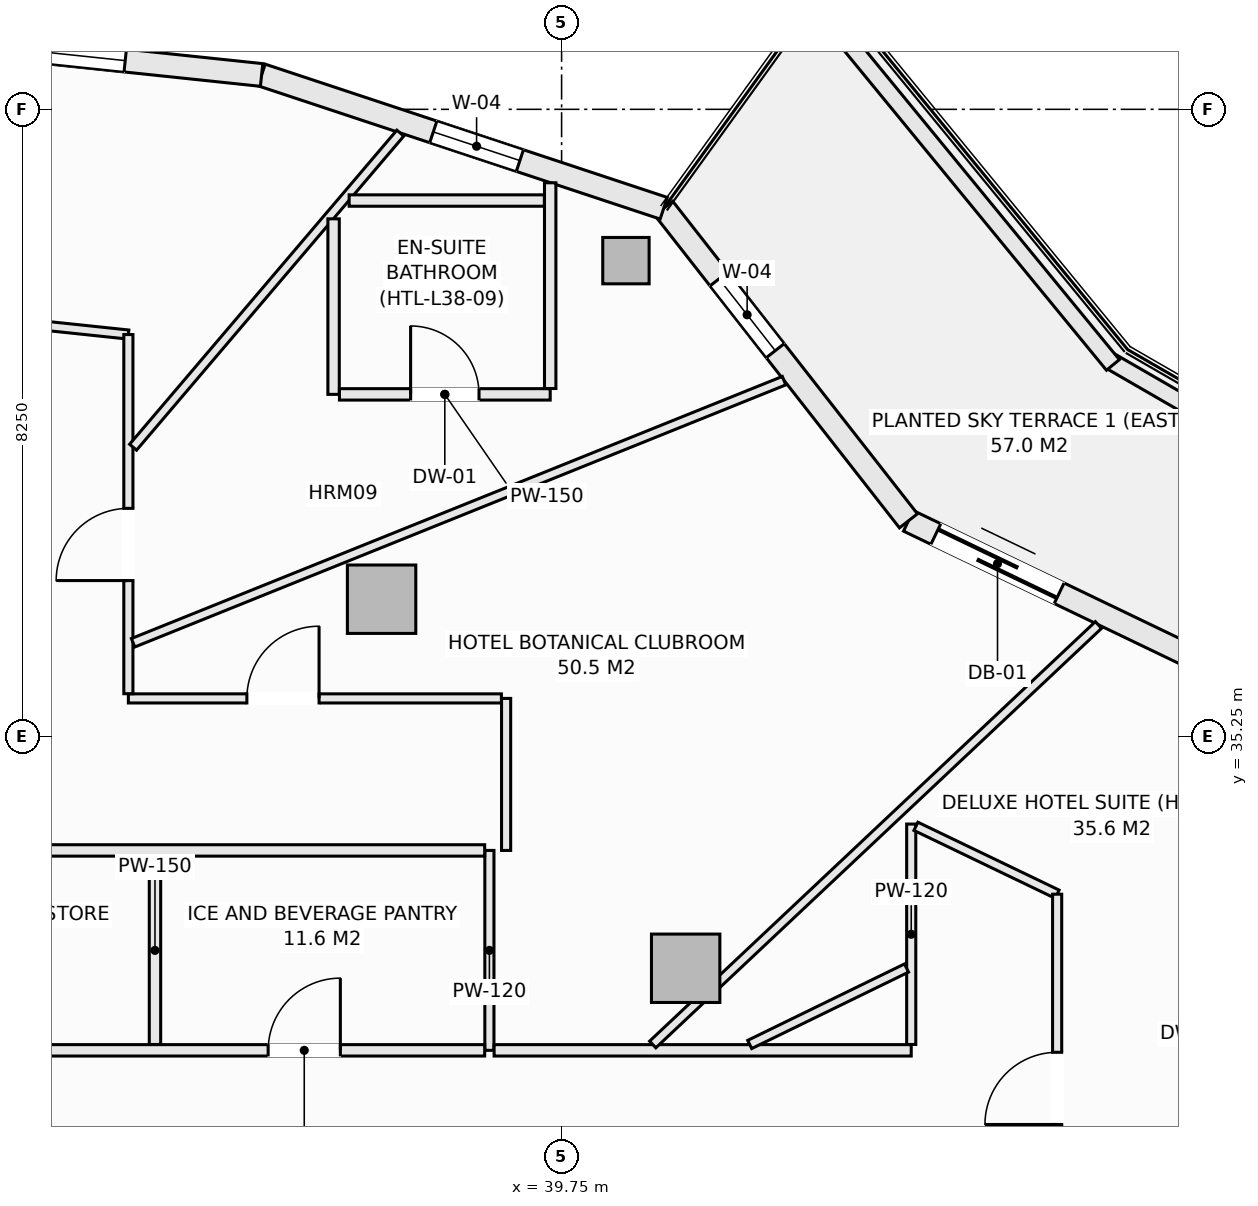
"""IFC4 building model, lengths in metres.
Left out: names, types, materials, properties, quantities, classifications, styles, units other than length and angle.
Written with IfcOpenShell. Run it as: python <this file> out.ifc"""

import sys

from ifc_helpers import new_model, si_unit, direction, frame, frame_2d, origin, origin_2d, place, context, subcontext, project, spatial, rectangle, hollow_rectangle, extrude, element, fill, save


model = new_model("IFC4")
c1 = context("Model", 3, precision=1e-05, world=origin(), true_north=direction((0.0, 1.0)))
c2 = subcontext(c1, "Body", "Model", "MODEL_VIEW")
j1 = project(units=[si_unit("LENGTHUNIT", "METRE"), si_unit("PLANEANGLEUNIT", "RADIAN")], contexts=[c1])
p1 = place(None, origin())
s1 = spatial("IfcSite", under=j1, at=p1, CompositionType="ELEMENT")
p2 = place(p1, origin())
s2 = spatial("IfcBuilding", under=s1, at=p2, CompositionType="ELEMENT")
p3 = place(p2, frame((0.0, 0.0, 149.5)))
s3 = spatial("IfcBuildingStorey", under=s2, at=p3, CompositionType="ELEMENT", Elevation=149.5)
p4 = place(p3, frame((40.596, 41.51, -0.27), z_axis=(0.0, 0.0, 1.0), x_axis=(1.0, 0.0, 0.0)))
e1 = element("IfcColumn", 1, at=p4, inside=s3, PredefinedType="COLUMN", context=c2, shape_type="SweptSolid", body=[
    extrude(hollow_rectangle(XDim=0.61, YDim=0.61, WallThickness=0.025, at=origin_2d()), origin(), (0.0, 0.0, 1.0), 3.4),
])
for number, where, z_axis, x_axis in (
    (2, (41.382, 32.199, -0.27), (0.0, 0.0, 1.0), (1.0, 0.0, 0.0)),
    (3, (37.382, 37.055, -0.27), (0.0, 0.0, 1.0), (1.0, 0.0, 0.0)),
):
    element("IfcColumn", number, at=place(p3, frame(where, z_axis=z_axis, x_axis=x_axis)), inside=s3, PredefinedType="COLUMN", context=c2, shape_type="SweptSolid", body=[
        extrude(rectangle(XDim=0.9, YDim=0.9, at=origin_2d()), origin(), (0.0, 0.0, 1.0), 3.4),
    ])
p5 = place(p3, frame((44.313, 38.086, 0.0), z_axis=(0.0, 0.0, 1.0), x_axis=(0.901353070301, -0.433085029363, 0.0)))
e4 = element("IfcWall", 4, at=p5, inside=s3, PredefinedType="SOLIDWALL", context=c2, shape_type="SweptSolid", body=[
    extrude(rectangle(XDim=5.336, YDim=0.3, at=frame_2d((2.668, 0.0))), origin(), (0.0, 0.0, 1.0), 2.653),
])
p6 = place(p5, frame((0.4, 0.0, 0.0)))
e5 = element("IfcOpeningElement", 5, at=p6, cuts=e4, PredefinedType="OPENING", context=c2, shape_type="SweptSolid", body=[
    extrude(rectangle(XDim=1.8, YDim=2.25, at=frame_2d((0.9, 1.125))), frame((0.0, 0.16, 0.0), z_axis=(0.0, -1.0, 0.0), x_axis=(1.0, 0.0, 0.0)), (0.0, 0.0, 1.0), 0.32),
])
p7 = place(p3, frame((41.094, 42.199, 0.0), z_axis=(0.0, 0.0, 1.0), x_axis=(0.616429245738, -0.787410302828, 0.0)))
e6 = element("IfcWall", 6, at=p7, inside=s3, PredefinedType="SOLIDWALL", context=c2, shape_type="SweptSolid", body=[
    extrude(rectangle(XDim=5.223, YDim=0.3, at=frame_2d((2.612, 0.0))), origin(), (0.0, 0.0, 1.0), 2.653),
])
p8 = place(p7, frame((1.18, 0.0, 0.72)))
e7 = element("IfcOpeningElement", 7, at=p8, cuts=e6, PredefinedType="OPENING", context=c2, shape_type="SweptSolid", body=[
    extrude(rectangle(XDim=1.2, YDim=1.65, at=frame_2d((0.6, 0.825))), frame((0.0, 0.16, 0.0), z_axis=(0.0, -1.0, 0.0), x_axis=(1.0, 0.0, 0.0)), (0.0, 0.0, 1.0), 0.32),
])
p9 = place(p3, frame((35.803, 43.952, 0.0), z_axis=(0.0, 0.0, 1.0), x_axis=(0.949246811547, -0.314532177636, 0.0)))
e8 = element("IfcWall", 8, at=p9, inside=s3, PredefinedType="SOLIDWALL", context=c2, shape_type="SweptSolid", body=[
    extrude(rectangle(XDim=5.574, YDim=0.3, at=frame_2d((2.787, 0.0))), origin(), (0.0, 0.0, 1.0), 2.653),
])
p10 = place(p9, frame((2.38, 0.0, 0.72)))
e9 = element("IfcOpeningElement", 9, at=p10, cuts=e8, PredefinedType="OPENING", context=c2, shape_type="SweptSolid", body=[
    extrude(rectangle(XDim=1.2, YDim=1.65, at=frame_2d((0.6, 0.825))), frame((0.0, 0.16, 0.0), z_axis=(0.0, -1.0, 0.0), x_axis=(1.0, 0.0, 0.0)), (0.0, 0.0, 1.0), 0.32),
])
p11 = place(p3, frame((30.125, 44.55, 0.0), z_axis=(0.0, 0.0, 1.0), x_axis=(0.994496545245, -0.104769372887, 0.0)))
e10 = element("IfcWall", 10, at=p11, inside=s3, PredefinedType="SOLIDWALL", context=c2, shape_type="SweptSolid", body=[
    extrude(rectangle(XDim=5.709, YDim=0.3, at=frame_2d((2.854, 0.0))), origin(), (0.0, 0.0, 1.0), 2.653),
])
p12 = place(p11, frame((1.805, 0.0, 0.74)))
e11 = element("IfcOpeningElement", 11, at=p12, cuts=e10, PredefinedType="OPENING", context=c2, shape_type="SweptSolid", body=[
    extrude(rectangle(XDim=2.1, YDim=1.7, at=frame_2d((1.05, 0.85))), frame((0.0, 0.16, 0.0), z_axis=(0.0, -1.0, 0.0), x_axis=(1.0, 0.0, 0.0)), (0.0, 0.0, 1.0), 0.32),
])
p13 = place(p3, frame((46.958, 40.195, 0.0), z_axis=(0.0, 0.0, 1.0), x_axis=(0.866058128659, -0.499943314571, 0.0)))
e12 = element("IfcWall", 12, at=p13, inside=s3, PredefinedType="PARAPET", context=c2, shape_type="SweptSolid", body=[
    extrude(rectangle(XDim=6.06, YDim=0.22, at=frame_2d((3.03, 0.0))), origin(), (0.0, 0.0, 1.0), 0.52),
])
p14 = place(p3, frame((43.042, 44.964, 0.0), z_axis=(0.0, 0.0, 1.0), x_axis=(0.634429234628, -0.77298094818, 0.0)))
e13 = element("IfcWall", 13, at=p14, inside=s3, PredefinedType="PARAPET", context=c2, shape_type="SweptSolid", body=[
    extrude(rectangle(XDim=6.245, YDim=0.22, at=frame_2d((3.123, 0.0))), origin(), (0.0, 0.0, 1.0), 0.52),
])
p15 = place(p3, frame((38.8, 31.12, 0.0), z_axis=(0.0, 0.0, 1.0), x_axis=(0.0, 1.0, 0.0)))
e14 = element("IfcWall", 14, at=p15, inside=s3, PredefinedType="PARTITIONING", context=c2, shape_type="SweptSolid", body=[
    extrude(rectangle(XDim=2.63, YDim=0.12, at=frame_2d((1.315, 0.0))), origin(), (0.0, 0.0, 1.0), 3.13),
])
p16 = place(p3, frame((30.077, 31.12, 0.0), z_axis=(0.0, 0.0, 1.0), x_axis=(1.0, 0.0, 0.0)))
e15 = element("IfcWall", 15, at=p16, inside=s3, PredefinedType="PARTITIONING", context=c2, shape_type="SweptSolid", body=[
    extrude(rectangle(XDim=8.661, YDim=0.15, at=frame_2d((4.331, 0.0))), origin(), (0.0, 0.0, 1.0), 3.13),
])
p17 = place(p16, frame((1.892, 0.0, 0.0)))
e16 = element("IfcOpeningElement", 16, at=p17, cuts=e15, PredefinedType="OPENING", context=c2, shape_type="SweptSolid", body=[
    extrude(rectangle(XDim=0.95, YDim=2.1, at=frame_2d((0.475, 1.05))), frame((0.0, 0.085, 0.0), z_axis=(0.0, -1.0, 0.0), x_axis=(1.0, 0.0, 0.0)), (0.0, 0.0, 1.0), 0.17),
])
p18 = place(p16, frame((5.812, 0.0, 0.0)))
e17 = element("IfcOpeningElement", 17, at=p18, cuts=e15, PredefinedType="OPENING", context=c2, shape_type="SweptSolid", body=[
    extrude(rectangle(XDim=0.95, YDim=2.1, at=frame_2d((0.475, 1.05))), frame((0.0, 0.085, 0.0), z_axis=(0.0, -1.0, 0.0), x_axis=(1.0, 0.0, 0.0)), (0.0, 0.0, 1.0), 0.17),
])
p19 = place(p3, frame((38.862, 31.12, 0.0), z_axis=(0.0, 0.0, 1.0), x_axis=(1.0, 0.0, 0.0)))
e18 = element("IfcWall", 18, at=p19, inside=s3, PredefinedType="PARTITIONING", context=c2, shape_type="SweptSolid", body=[
    extrude(rectangle(XDim=5.488, YDim=0.15, at=frame_2d((2.744, 0.0))), origin(), (0.0, 0.0, 1.0), 3.13),
])
p20 = place(p3, frame((30.077, 33.75, 0.0), z_axis=(0.0, 0.0, 1.0), x_axis=(1.0, 0.0, 0.0)))
e19 = element("IfcWall", 19, at=p20, inside=s3, PredefinedType="PARTITIONING", context=c2, shape_type="SweptSolid", body=[
    extrude(rectangle(XDim=8.661, YDim=0.15, at=frame_2d((4.331, 0.0))), origin(), (0.0, 0.0, 1.0), 3.13),
])
p21 = place(p3, frame((34.4, 31.197, 0.0), z_axis=(0.0, 0.0, 1.0), x_axis=(0.0, 1.0, 0.0)))
e20 = element("IfcWall", 20, at=p21, inside=s3, PredefinedType="PARTITIONING", context=c2, shape_type="SweptSolid", body=[
    extrude(rectangle(XDim=2.476, YDim=0.15, at=frame_2d((1.238, 0.0))), origin(), (0.0, 0.0, 1.0), 3.13),
])
p22 = place(p3, frame((39.02, 33.75, 0.0), z_axis=(0.0, 0.0, 1.0), x_axis=(0.0, 1.0, 0.0)))
e21 = element("IfcWall", 21, at=p22, inside=s3, PredefinedType="PARTITIONING", context=c2, shape_type="SweptSolid", body=[
    extrude(rectangle(XDim=2.0, YDim=0.12, at=frame_2d((1.0, 0.0))), origin(), (0.0, 0.0, 1.0), 3.13),
])
p23 = place(p3, frame((34.05, 35.75, 0.0), z_axis=(0.0, 0.0, 1.0), x_axis=(1.0, 0.0, 0.0)))
e22 = element("IfcWall", 22, at=p23, inside=s3, PredefinedType="PARTITIONING", context=c2, shape_type="SweptSolid", body=[
    extrude(rectangle(XDim=4.908, YDim=0.12, at=frame_2d((2.454, 0.0))), origin(), (0.0, 0.0, 1.0), 2.505),
])
p24 = place(p23, frame((1.559, 0.0, 0.0)))
e23 = element("IfcOpeningElement", 23, at=p24, cuts=e22, PredefinedType="OPENING", context=c2, shape_type="SweptSolid", body=[
    extrude(rectangle(XDim=0.95, YDim=2.1, at=frame_2d((0.475, 1.05))), frame((0.0, 0.07, 0.0), z_axis=(0.0, -1.0, 0.0), x_axis=(1.0, 0.0, 0.0)), (0.0, 0.0, 1.0), 0.14),
])
p25 = place(p3, frame((32.212, 40.73, 0.0), z_axis=(0.0, 0.0, 1.0), x_axis=(0.994512688404, -0.1046160246, 0.0)))
e24 = element("IfcWall", 24, at=p25, inside=s3, PredefinedType="PARTITIONING", context=c2, shape_type="SweptSolid", body=[
    extrude(rectangle(XDim=1.848, YDim=0.12, at=frame_2d((0.924, 0.0))), origin(), (0.0, 0.0, 1.0), 3.13),
])
p26 = place(p3, frame((34.05, 35.812, 0.0), z_axis=(0.0, 0.0, 1.0), x_axis=(0.0, 1.0, 0.0)))
e25 = element("IfcWall", 25, at=p26, inside=s3, PredefinedType="PARTITIONING", context=c2, shape_type="SweptSolid", body=[
    extrude(rectangle(XDim=4.725, YDim=0.12, at=frame_2d((2.363, 0.0))), origin(), (0.0, 0.0, 1.0), 2.812),
])
p27 = place(p26, frame((1.488, 0.0, 0.0)))
e26 = element("IfcOpeningElement", 26, at=p27, cuts=e25, PredefinedType="OPENING", context=c2, shape_type="SweptSolid", body=[
    extrude(rectangle(XDim=0.95, YDim=2.1, at=frame_2d((0.475, 1.05))), frame((0.0, 0.07, 0.0), z_axis=(0.0, -1.0, 0.0), x_axis=(1.0, 0.0, 0.0)), (0.0, 0.0, 1.0), 0.14),
])
p28 = place(p3, frame((44.35, 31.197, 0.0), z_axis=(0.0, 0.0, 1.0), x_axis=(0.0, 1.0, 0.0)))
e27 = element("IfcWall", 27, at=p28, inside=s3, PredefinedType="PARTITIONING", context=c2, shape_type="SweptSolid", body=[
    extrude(rectangle(XDim=2.9, YDim=0.12, at=frame_2d((1.45, 0.0))), origin(), (0.0, 0.0, 1.0), 3.13),
])
p29 = place(p3, frame((44.412, 34.067, 0.0), z_axis=(0.0, 0.0, 1.0), x_axis=(0.90128266231, -0.433231534656, 0.0)))
e28 = element("IfcWall", 28, at=p29, inside=s3, PredefinedType="PARTITIONING", context=c2, shape_type="SweptSolid", body=[
    extrude(rectangle(XDim=2.062, YDim=0.12, at=frame_2d((1.031, 0.0))), origin(), (0.0, 0.0, 1.0), 3.13),
])
p30 = place(p3, frame((46.27, 20.826, 0.0), z_axis=(0.0, 0.0, 1.0), x_axis=(0.0, 1.0, 0.0)))
e29 = element("IfcWall", 29, at=p30, inside=s3, PredefinedType="PARTITIONING", context=c2, shape_type="SweptSolid", body=[
    extrude(rectangle(XDim=12.348, YDim=0.12, at=frame_2d((6.174, 0.0))), origin(), (0.0, 0.0, 1.0), 3.13),
])
p31 = place(p30, frame((3.556, 0.0, 0.0)))
e30 = element("IfcOpeningElement", 30, at=p31, cuts=e29, PredefinedType="OPENING", context=c2, shape_type="SweptSolid", body=[
    extrude(rectangle(XDim=0.95, YDim=2.1, at=frame_2d((0.475, 1.05))), frame((0.0, 0.07, 0.0), z_axis=(0.0, -1.0, 0.0), x_axis=(1.0, 0.0, 0.0)), (0.0, 0.0, 1.0), 0.14),
])
p32 = place(p30, frame((9.318, 0.0, 0.0)))
e31 = element("IfcOpeningElement", 31, at=p32, cuts=e29, PredefinedType="OPENING", context=c2, shape_type="SweptSolid", body=[
    extrude(rectangle(XDim=0.95, YDim=2.1, at=frame_2d((0.475, 1.05))), frame((0.0, 0.07, 0.0), z_axis=(0.0, -1.0, 0.0), x_axis=(1.0, 0.0, 0.0)), (0.0, 0.0, 1.0), 0.14),
])
p33 = place(p3, frame((42.225, 31.197, 0.0), z_axis=(0.0, 0.0, 1.0), x_axis=(0.898870643835, 0.438214063732, 0.0)))
e32 = element("IfcWall", 32, at=p33, inside=s3, PredefinedType="PARTITIONING", context=c2, shape_type="SweptSolid", body=[
    extrude(rectangle(XDim=2.295, YDim=0.12, at=frame_2d((1.148, 0.0))), origin(), (0.0, 0.0, 1.0), 3.13),
])
p34 = place(p3, frame((40.949, 31.197, 0.0), z_axis=(0.0, 0.0, 1.0), x_axis=(0.728258728927, 0.685302286397, 0.0)))
e33 = element("IfcWall", 33, at=p34, inside=s3, PredefinedType="PARTITIONING", context=c2, shape_type="SweptSolid", body=[
    extrude(rectangle(XDim=8.053, YDim=0.12, at=frame_2d((4.027, 0.0))), origin(), (0.0, 0.0, 1.0), 2.812),
])
p35 = place(p3, frame((34.112, 36.482, 0.0), z_axis=(0.0, 0.0, 1.0), x_axis=(0.92763911586, 0.373477804863, 0.0)))
e34 = element("IfcWall", 34, at=p35, inside=s3, PredefinedType="PARTITIONING", context=c2, shape_type="SweptSolid", body=[
    extrude(rectangle(XDim=9.233, YDim=0.12, at=frame_2d((4.616, 0.0))), origin(), (0.0, 0.0, 1.0), 2.505),
])
p36 = place(p3, frame((34.112, 39.055, 0.0), z_axis=(0.0, 0.0, 1.0), x_axis=(0.64805977237, 0.761589476973, 0.0)))
e35 = element("IfcWall", 35, at=p36, inside=s3, PredefinedType="PARTITIONING", context=c2, shape_type="SweptSolid", body=[
    extrude(rectangle(XDim=5.426, YDim=0.12, at=frame_2d((2.713, 0.0))), origin(), (0.0, 0.0, 1.0), 2.812),
])
p37 = place(p3, frame((36.75, 39.75, 0.0), z_axis=(0.0, 0.0, 1.0), x_axis=(0.0, 1.0, 0.0)))
e36 = element("IfcWall", 36, at=p37, inside=s3, PredefinedType="PARTITIONING", context=c2, shape_type="SweptSolid", body=[
    extrude(rectangle(XDim=2.309, YDim=0.15, at=frame_2d((1.155, 0.0))), origin(), (0.0, 0.0, 1.0), 3.13),
])
p38 = place(p3, frame((36.827, 39.75, 0.0), z_axis=(0.0, 0.0, 1.0), x_axis=(1.0, 0.0, 0.0)))
e37 = element("IfcWall", 37, at=p38, inside=s3, PredefinedType="PARTITIONING", context=c2, shape_type="SweptSolid", body=[
    extrude(rectangle(XDim=2.773, YDim=0.15, at=frame_2d((1.387, 0.0))), origin(), (0.0, 0.0, 1.0), 3.13),
])
p39 = place(p38, frame((0.937, 0.0, 0.0)))
e38 = element("IfcOpeningElement", 38, at=p39, cuts=e37, PredefinedType="OPENING", context=c2, shape_type="SweptSolid", body=[
    extrude(rectangle(XDim=0.9, YDim=2.1, at=frame_2d((0.45, 1.05))), frame((0.0, 0.085, 0.0), z_axis=(0.0, -1.0, 0.0), x_axis=(1.0, 0.0, 0.0)), (0.0, 0.0, 1.0), 0.17),
])
p40 = place(p3, frame((39.6, 39.827, 0.0), z_axis=(0.0, 0.0, 1.0), x_axis=(0.0, 1.0, 0.0)))
e39 = element("IfcWall", 39, at=p40, inside=s3, PredefinedType="PARTITIONING", context=c2, shape_type="SweptSolid", body=[
    extrude(rectangle(XDim=2.707, YDim=0.15, at=frame_2d((1.354, 0.0))), origin(), (0.0, 0.0, 1.0), 2.505),
])
p41 = place(p3, frame((36.955, 42.3, 0.0), z_axis=(0.0, 0.0, 1.0), x_axis=(1.0, 0.0, 0.0)))
e40 = element("IfcWall", 40, at=p41, inside=s3, PredefinedType="PARTITIONING", context=c2, shape_type="SweptSolid", body=[
    extrude(rectangle(XDim=2.568, YDim=0.15, at=frame_2d((1.284, 0.0))), origin(), (0.0, 0.0, 1.0), 2.653),
])
p42 = place(p6, origin())
e41 = element("IfcDoor", 41, at=p42, inside=s3, OperationType="SLIDING_TO_LEFT", PredefinedType="DOOR", context=c2, shape_type="SweptSolid", body=[
    extrude(rectangle(XDim=1.8, YDim=2.25, at=frame_2d((0.9, 1.125))), frame((0.0, 0.025, 0.0), z_axis=(0.0, -1.0, 0.0), x_axis=(1.0, 0.0, 0.0)), (0.0, 0.0, 1.0), 0.05),
])
fill(e5, e41)
p43 = place(p8, origin())
e42 = element("IfcWindow", 42, at=p43, inside=s3, PartitioningType="SINGLE_PANEL", PredefinedType="WINDOW", context=c2, shape_type="SweptSolid", body=[
    extrude(rectangle(XDim=1.2, YDim=1.65, at=frame_2d((0.6, 0.825))), frame((0.0, 0.03, 0.0), z_axis=(0.0, -1.0, 0.0), x_axis=(1.0, 0.0, 0.0)), (0.0, 0.0, 1.0), 0.06),
])
fill(e7, e42)
p44 = place(p10, origin())
e43 = element("IfcWindow", 43, at=p44, inside=s3, PartitioningType="SINGLE_PANEL", PredefinedType="WINDOW", context=c2, shape_type="SweptSolid", body=[
    extrude(rectangle(XDim=1.2, YDim=1.65, at=frame_2d((0.6, 0.825))), frame((0.0, 0.03, 0.0), z_axis=(0.0, -1.0, 0.0), x_axis=(1.0, 0.0, 0.0)), (0.0, 0.0, 1.0), 0.06),
])
fill(e9, e43)
p45 = place(p12, origin())
e44 = element("IfcWindow", 44, at=p45, inside=s3, PartitioningType="SINGLE_PANEL", PredefinedType="WINDOW", context=c2, shape_type="SweptSolid", body=[
    extrude(rectangle(XDim=2.1, YDim=1.7, at=frame_2d((1.05, 0.85))), frame((0.0, 0.03, 0.0), z_axis=(0.0, -1.0, 0.0), x_axis=(1.0, 0.0, 0.0)), (0.0, 0.0, 1.0), 0.06),
])
fill(e11, e44)
p46 = place(p18, origin())
e45 = element("IfcDoor", 45, at=p46, inside=s3, OperationType="SINGLE_SWING_RIGHT", PredefinedType="DOOR", context=c2, shape_type="SweptSolid", body=[
    extrude(rectangle(XDim=0.95, YDim=2.1, at=frame_2d((0.475, 1.05))), frame((0.0, 0.025, 0.0), z_axis=(0.0, -1.0, 0.0), x_axis=(1.0, 0.0, 0.0)), (0.0, 0.0, 1.0), 0.05),
])
fill(e17, e45)
p47 = place(p32, origin())
e46 = element("IfcDoor", 46, at=p47, inside=s3, OperationType="SINGLE_SWING_LEFT", PredefinedType="DOOR", context=c2, shape_type="SweptSolid", body=[
    extrude(rectangle(XDim=0.95, YDim=2.1, at=frame_2d((0.475, 1.05))), frame((0.0, 0.025, 0.0), z_axis=(0.0, -1.0, 0.0), x_axis=(1.0, 0.0, 0.0)), (0.0, 0.0, 1.0), 0.05),
])
fill(e31, e46)
p48 = place(p24, origin())
e47 = element("IfcDoor", 47, at=p48, inside=s3, OperationType="SINGLE_SWING_RIGHT", PredefinedType="DOOR", context=c2, shape_type="SweptSolid", body=[
    extrude(rectangle(XDim=0.95, YDim=2.1, at=frame_2d((0.475, 1.05))), frame((0.0, 0.025, 0.0), z_axis=(0.0, -1.0, 0.0), x_axis=(1.0, 0.0, 0.0)), (0.0, 0.0, 1.0), 0.05),
])
fill(e23, e47)
p49 = place(p27, origin())
e48 = element("IfcDoor", 48, at=p49, inside=s3, OperationType="SINGLE_SWING_LEFT", PredefinedType="DOOR", context=c2, shape_type="SweptSolid", body=[
    extrude(rectangle(XDim=0.95, YDim=2.1, at=frame_2d((0.475, 1.05))), frame((0.0, 0.025, 0.0), z_axis=(0.0, -1.0, 0.0), x_axis=(1.0, 0.0, 0.0)), (0.0, 0.0, 1.0), 0.05),
])
fill(e26, e48)
p50 = place(p39, origin())
e49 = element("IfcDoor", 49, at=p50, inside=s3, OperationType="SINGLE_SWING_LEFT", PredefinedType="DOOR", context=c2, shape_type="SweptSolid", body=[
    extrude(rectangle(XDim=0.9, YDim=2.1, at=frame_2d((0.45, 1.05))), frame((0.0, 0.025, 0.0), z_axis=(0.0, -1.0, 0.0), x_axis=(1.0, 0.0, 0.0)), (0.0, 0.0, 1.0), 0.05),
])
fill(e38, e49)
save(model, sys.argv[1])
